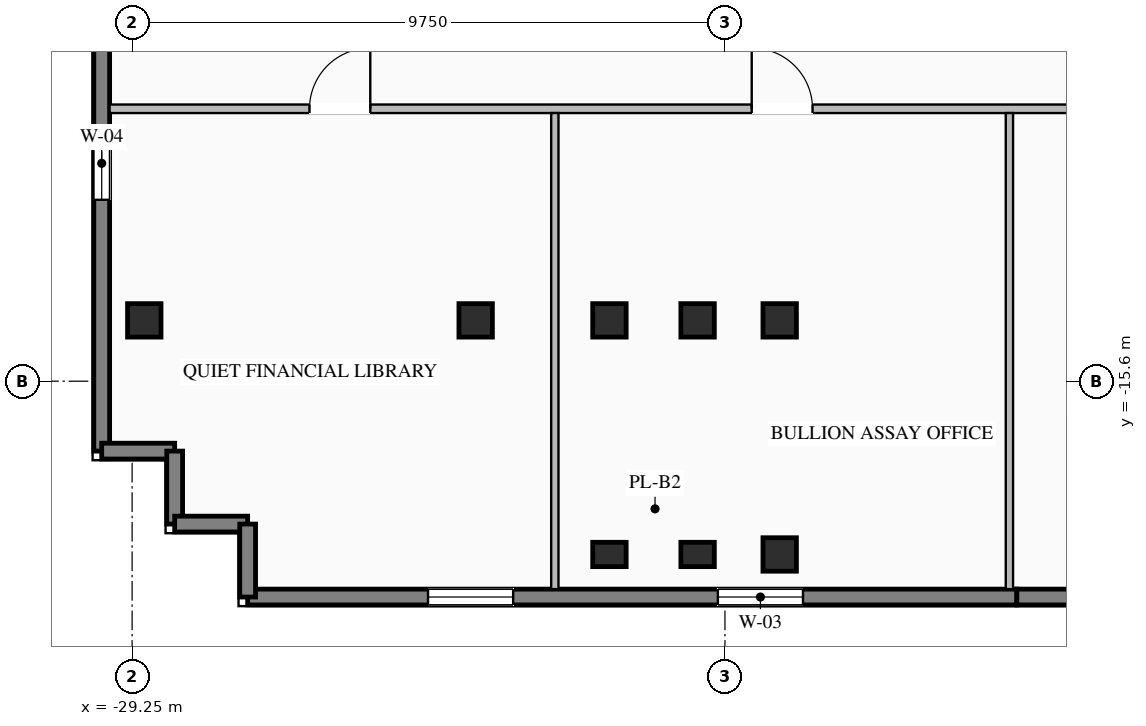
"""IFC4 building model, lengths in metres.
Left out: names, types, materials, properties, quantities, classifications, styles, units other than length and angle.
Written with IfcOpenShell. Run it as: python <this file> out.ifc"""

import sys

from ifc_helpers import new_model, si_unit, direction, frame, frame_2d, origin, origin_2d, place, context, subcontext, project, spatial, rectangle, i_section, extrude, element, fill, save


model = new_model("IFC4")
c1 = context("Model", 3, precision=1e-05, world=origin(), true_north=direction((0.0, 1.0)))
c2 = subcontext(c1, "Body", "Model", "MODEL_VIEW")
j1 = project(units=[si_unit("LENGTHUNIT", "METRE"), si_unit("PLANEANGLEUNIT", "RADIAN")], contexts=[c1])
p1 = place(None, origin())
s1 = spatial("IfcSite", under=j1, at=p1, CompositionType="ELEMENT")
p2 = place(p1, origin())
s2 = spatial("IfcBuilding", under=s1, at=p2, CompositionType="ELEMENT")
p3 = place(p2, frame((0.0, 0.0, 229.2)))
s3 = spatial("IfcBuildingStorey", under=s2, at=p3, CompositionType="ELEMENT", Elevation=229.2)
for number, where, z_axis, x_axis in (
    (1, (-21.4, -14.6, 0.0), (0.0, 0.0, 1.0), (1.0, 0.0, 0.0)),
    (2, (-19.95, -14.6, 0.0), (0.0, 0.0, 1.0), (1.0, 0.0, 0.0)),
    (3, (-18.6, -14.6, 0.0), (0.0, 0.0, 1.0), (1.0, 0.0, 0.0)),
    (4, (-23.6, -14.6, 0.0), (0.0, 0.0, 1.0), (1.0, 0.0, 0.0)),
    (5, (-18.6, -18.45, 0.0), (0.0, 0.0, 1.0), (1.0, 0.0, 0.0)),
    (6, (-29.05, -14.6, 0.0), (0.0, 0.0, 1.0), (1.0, 0.0, 0.0)),
):
    element("IfcColumn", number, at=place(p3, frame(where, z_axis=z_axis, x_axis=x_axis)), inside=s3, PredefinedType="COLUMN", context=c2, shape_type="SweptSolid", body=[
        extrude(i_section(OverallWidth=0.55, OverallDepth=0.55, WebThickness=0.024, FlangeThickness=0.036, at=origin_2d()), origin(), (0.0, 0.0, 1.0), 3.45),
    ])
for number, where, z_axis, x_axis in (
    (7, (-21.4, -18.45, 0.0), (0.0, 0.0, 1.0), (1.0, 0.0, 0.0)),
    (8, (-19.95, -18.45, 0.0), (0.0, 0.0, 1.0), (1.0, 0.0, 0.0)),
):
    element("IfcColumn", number, at=place(p3, frame(where, z_axis=z_axis, x_axis=x_axis)), inside=s3, PredefinedType="PILASTER", context=c2, shape_type="SweptSolid", body=[
        extrude(rectangle(XDim=0.55, YDim=0.4, at=origin_2d()), origin(), (0.0, 0.0, 1.0), 3.45),
    ])
p4 = place(p3, frame((-14.7, -19.15, 0.0), z_axis=(0.0, 0.0, 1.0), x_axis=(-1.0, 0.0, 0.0)))
e9 = element("IfcWall", 9, at=p4, inside=s3, PredefinedType="STANDARD", context=c2, shape_type="SweptSolid", body=[
    extrude(rectangle(XDim=12.65, YDim=0.26, at=frame_2d((6.325, 0.0))), origin(), (0.0, 0.0, 1.0), 3.25),
])
p5 = place(p4, frame((3.517, 0.0, 0.76)))
e10 = element("IfcOpeningElement", 10, at=p5, cuts=e9, PredefinedType="OPENING", context=c2, shape_type="SweptSolid", body=[
    extrude(rectangle(XDim=1.4, YDim=1.95, at=frame_2d((0.7, 0.975))), frame((0.0, 0.14, 0.0), z_axis=(0.0, -1.0, 0.0), x_axis=(1.0, 0.0, 0.0)), (0.0, 0.0, 1.0), 0.28),
])
p6 = place(p4, frame((8.283, 0.0, 0.76)))
e11 = element("IfcOpeningElement", 11, at=p6, cuts=e9, PredefinedType="OPENING", context=c2, shape_type="SweptSolid", body=[
    extrude(rectangle(XDim=1.4, YDim=1.95, at=frame_2d((0.7, 0.975))), frame((0.0, 0.14, 0.0), z_axis=(0.0, -1.0, 0.0), x_axis=(1.0, 0.0, 0.0)), (0.0, 0.0, 1.0), 0.28),
])
p7 = place(p3, frame((-5.7, -19.15, 0.0), z_axis=(0.0, 0.0, 1.0), x_axis=(-1.0, 0.0, 0.0)))
e12 = element("IfcWall", 12, at=p7, inside=s3, PredefinedType="STANDARD", context=c2, shape_type="SweptSolid", body=[
    extrude(rectangle(XDim=9.0, YDim=0.26, at=frame_2d((4.5, 0.0))), origin(), (0.0, 0.0, 1.0), 3.25),
])
p8 = place(p7, frame((2.3, 0.0, 0.76)))
e13 = element("IfcOpeningElement", 13, at=p8, cuts=e12, PredefinedType="OPENING", context=c2, shape_type="SweptSolid", body=[
    extrude(rectangle(XDim=1.4, YDim=1.95, at=frame_2d((0.7, 0.975))), frame((0.0, 0.14, 0.0), z_axis=(0.0, -1.0, 0.0), x_axis=(1.0, 0.0, 0.0)), (0.0, 0.0, 1.0), 0.28),
])
p9 = place(p7, frame((5.3, 0.0, 0.76)))
e14 = element("IfcOpeningElement", 14, at=p9, cuts=e12, PredefinedType="OPENING", context=c2, shape_type="SweptSolid", body=[
    extrude(rectangle(XDim=1.4, YDim=1.95, at=frame_2d((0.7, 0.975))), frame((0.0, 0.14, 0.0), z_axis=(0.0, -1.0, 0.0), x_axis=(1.0, 0.0, 0.0)), (0.0, 0.0, 1.0), 0.28),
])
p10 = place(p3, frame((-29.75, -16.75, 0.0), z_axis=(0.0, 0.0, 1.0), x_axis=(0.0, 1.0, 0.0)))
e15 = element("IfcWall", 15, at=p10, inside=s3, PredefinedType="STANDARD", context=c2, shape_type="SweptSolid", body=[
    extrude(rectangle(XDim=15.85, YDim=0.26, at=frame_2d((7.925, 0.0))), origin(), (0.0, 0.0, 1.0), 3.25),
])
p11 = place(p10, frame((4.133, 0.0, 0.76)))
e16 = element("IfcOpeningElement", 16, at=p11, cuts=e15, PredefinedType="OPENING", context=c2, shape_type="SweptSolid", body=[
    extrude(rectangle(XDim=1.2, YDim=1.95, at=frame_2d((0.6, 0.975))), frame((0.0, 0.14, 0.0), z_axis=(0.0, -1.0, 0.0), x_axis=(1.0, 0.0, 0.0)), (0.0, 0.0, 1.0), 0.28),
])
p12 = place(p10, frame((9.967, 0.0, 0.76)))
e17 = element("IfcOpeningElement", 17, at=p12, cuts=e15, PredefinedType="OPENING", context=c2, shape_type="SweptSolid", body=[
    extrude(rectangle(XDim=1.2, YDim=1.95, at=frame_2d((0.6, 0.975))), frame((0.0, 0.14, 0.0), z_axis=(0.0, -1.0, 0.0), x_axis=(1.0, 0.0, 0.0)), (0.0, 0.0, 1.0), 0.28),
])
for number, where, z_axis, x_axis in (
    (18, (-29.75, -16.75, 0.0), (0.0, 0.0, 1.0), (1.0, 0.0, 0.0)),
    (19, (-28.55, -16.75, 0.0), (0.0, 0.0, 1.0), (0.0, -1.0, 0.0)),
    (20, (-28.55, -17.95, 0.0), (0.0, 0.0, 1.0), (1.0, 0.0, 0.0)),
    (21, (-27.35, -17.95, 0.0), (0.0, 0.0, 1.0), (0.0, -1.0, 0.0)),
):
    element("IfcWall", number, at=place(p3, frame(where, z_axis=z_axis, x_axis=x_axis)), inside=s3, PredefinedType="STANDARD", context=c2, shape_type="SweptSolid", body=[
        extrude(rectangle(XDim=1.2, YDim=0.26, at=frame_2d((0.6, 0.0))), origin(), (0.0, 0.0, 1.0), 3.25),
    ])
p13 = place(p3, frame((-29.62, -11.12, 0.0), z_axis=(0.0, 0.0, 1.0), x_axis=(1.0, 0.0, 0.0)))
e22 = element("IfcWall", 22, at=p13, inside=s3, PredefinedType="STANDARD", context=c2, shape_type="SweptSolid", body=[
    extrude(rectangle(XDim=56.84, YDim=0.14, at=frame_2d((28.42, 0.0))), origin(), (0.0, 0.0, 1.0), 3.25),
])
p14 = place(p13, frame((22.71, 0.0, 0.0)))
e23 = element("IfcOpeningElement", 23, at=p14, cuts=e22, PredefinedType="OPENING", context=c2, shape_type="SweptSolid", body=[
    extrude(rectangle(XDim=0.92, YDim=2.08, at=frame_2d((0.46, 1.04))), frame((0.0, 0.08, 0.0), z_axis=(0.0, -1.0, 0.0), x_axis=(1.0, 0.0, 0.0)), (0.0, 0.0, 1.0), 0.16),
])
p15 = place(p13, frame((26.21, 0.0, 0.0)))
e24 = element("IfcOpeningElement", 24, at=p15, cuts=e22, PredefinedType="OPENING", context=c2, shape_type="SweptSolid", body=[
    extrude(rectangle(XDim=0.92, YDim=2.08, at=frame_2d((0.46, 1.04))), frame((0.0, 0.08, 0.0), z_axis=(0.0, -1.0, 0.0), x_axis=(1.0, 0.0, 0.0)), (0.0, 0.0, 1.0), 0.16),
])
p16 = place(p13, frame((29.06, 0.0, 0.0)))
e25 = element("IfcOpeningElement", 25, at=p16, cuts=e22, PredefinedType="OPENING", context=c2, shape_type="SweptSolid", body=[
    extrude(rectangle(XDim=0.92, YDim=2.08, at=frame_2d((0.46, 1.04))), frame((0.0, 0.08, 0.0), z_axis=(0.0, -1.0, 0.0), x_axis=(1.0, 0.0, 0.0)), (0.0, 0.0, 1.0), 0.16),
])
p17 = place(p13, frame((3.287, 0.0, 0.0)))
e26 = element("IfcOpeningElement", 26, at=p17, cuts=e22, PredefinedType="OPENING", context=c2, shape_type="SweptSolid", body=[
    extrude(rectangle(XDim=1.0, YDim=2.08, at=frame_2d((0.5, 1.04))), frame((0.0, 0.08, 0.0), z_axis=(0.0, -1.0, 0.0), x_axis=(1.0, 0.0, 0.0)), (0.0, 0.0, 1.0), 0.16),
])
p18 = place(p13, frame((10.56, 0.0, 0.0)))
e27 = element("IfcOpeningElement", 27, at=p18, cuts=e22, PredefinedType="OPENING", context=c2, shape_type="SweptSolid", body=[
    extrude(rectangle(XDim=1.0, YDim=2.08, at=frame_2d((0.5, 1.04))), frame((0.0, 0.08, 0.0), z_axis=(0.0, -1.0, 0.0), x_axis=(1.0, 0.0, 0.0)), (0.0, 0.0, 1.0), 0.16),
])
p19 = place(p13, frame((17.609, 0.0, 0.0)))
e28 = element("IfcOpeningElement", 28, at=p19, cuts=e22, PredefinedType="OPENING", context=c2, shape_type="SweptSolid", body=[
    extrude(rectangle(XDim=1.0, YDim=2.08, at=frame_2d((0.5, 1.04))), frame((0.0, 0.08, 0.0), z_axis=(0.0, -1.0, 0.0), x_axis=(1.0, 0.0, 0.0)), (0.0, 0.0, 1.0), 0.16),
])
p20 = place(p13, frame((34.567, 0.0, 0.0)))
e29 = element("IfcOpeningElement", 29, at=p20, cuts=e22, PredefinedType="OPENING", context=c2, shape_type="SweptSolid", body=[
    extrude(rectangle(XDim=1.0, YDim=2.08, at=frame_2d((0.5, 1.04))), frame((0.0, 0.08, 0.0), z_axis=(0.0, -1.0, 0.0), x_axis=(1.0, 0.0, 0.0)), (0.0, 0.0, 1.0), 0.16),
])
p21 = place(p13, frame((43.592, 0.0, 0.0)))
e30 = element("IfcOpeningElement", 30, at=p21, cuts=e22, PredefinedType="OPENING", context=c2, shape_type="SweptSolid", body=[
    extrude(rectangle(XDim=1.0, YDim=2.08, at=frame_2d((0.5, 1.04))), frame((0.0, 0.08, 0.0), z_axis=(0.0, -1.0, 0.0), x_axis=(1.0, 0.0, 0.0)), (0.0, 0.0, 1.0), 0.16),
])
p22 = place(p13, frame((52.129, 0.0, 0.0)))
e31 = element("IfcOpeningElement", 31, at=p22, cuts=e22, PredefinedType="OPENING", context=c2, shape_type="SweptSolid", body=[
    extrude(rectangle(XDim=1.0, YDim=2.08, at=frame_2d((0.5, 1.04))), frame((0.0, 0.08, 0.0), z_axis=(0.0, -1.0, 0.0), x_axis=(1.0, 0.0, 0.0)), (0.0, 0.0, 1.0), 0.16),
])
for number, where, z_axis, x_axis in (
    (32, (-22.298, -19.02, 0.0), (0.0, 0.0, 1.0), (0.0, 1.0, 0.0)),
    (33, (-14.822, -19.02, 0.0), (0.0, 0.0, 1.0), (0.0, 1.0, 0.0)),
):
    element("IfcWall", number, at=place(p3, frame(where, z_axis=z_axis, x_axis=x_axis)), inside=s3, PredefinedType="STANDARD", context=c2, shape_type="SweptSolid", body=[
        extrude(rectangle(XDim=7.83, YDim=0.12, at=frame_2d((3.915, 0.0))), origin(), (0.0, 0.0, 1.0), 3.25),
    ])
p23 = place(p5, origin())
e34 = element("IfcWindow", 34, at=p23, inside=s3, PartitioningType="SINGLE_PANEL", PredefinedType="WINDOW", context=c2, shape_type="SweptSolid", body=[
    extrude(rectangle(XDim=1.4, YDim=1.95, at=frame_2d((0.7, 0.975))), frame((0.0, 0.03, 0.0), z_axis=(0.0, -1.0, 0.0), x_axis=(1.0, 0.0, 0.0)), (0.0, 0.0, 1.0), 0.06),
])
fill(e10, e34)
p24 = place(p6, origin())
e35 = element("IfcWindow", 35, at=p24, inside=s3, PartitioningType="SINGLE_PANEL", PredefinedType="WINDOW", context=c2, shape_type="SweptSolid", body=[
    extrude(rectangle(XDim=1.4, YDim=1.95, at=frame_2d((0.7, 0.975))), frame((0.0, 0.03, 0.0), z_axis=(0.0, -1.0, 0.0), x_axis=(1.0, 0.0, 0.0)), (0.0, 0.0, 1.0), 0.06),
])
fill(e11, e35)
p25 = place(p11, origin())
e36 = element("IfcWindow", 36, at=p25, inside=s3, PartitioningType="SINGLE_PANEL", PredefinedType="WINDOW", context=c2, shape_type="SweptSolid", body=[
    extrude(rectangle(XDim=1.2, YDim=1.95, at=frame_2d((0.6, 0.975))), frame((0.0, 0.03, 0.0), z_axis=(0.0, -1.0, 0.0), x_axis=(1.0, 0.0, 0.0)), (0.0, 0.0, 1.0), 0.06),
])
fill(e16, e36)
p26 = place(p17, origin())
e37 = element("IfcDoor", 37, at=p26, inside=s3, OperationType="SINGLE_SWING_RIGHT", PredefinedType="DOOR", context=c2, shape_type="SweptSolid", body=[
    extrude(rectangle(XDim=1.0, YDim=2.08, at=frame_2d((0.5, 1.04))), frame((0.0, 0.025, 0.0), z_axis=(0.0, -1.0, 0.0), x_axis=(1.0, 0.0, 0.0)), (0.0, 0.0, 1.0), 0.05),
])
fill(e26, e37)
p27 = place(p18, origin())
e38 = element("IfcDoor", 38, at=p27, inside=s3, OperationType="SINGLE_SWING_LEFT", PredefinedType="DOOR", context=c2, shape_type="SweptSolid", body=[
    extrude(rectangle(XDim=1.0, YDim=2.08, at=frame_2d((0.5, 1.04))), frame((0.0, 0.025, 0.0), z_axis=(0.0, -1.0, 0.0), x_axis=(1.0, 0.0, 0.0)), (0.0, 0.0, 1.0), 0.05),
])
fill(e27, e38)
save(model, sys.argv[1])
